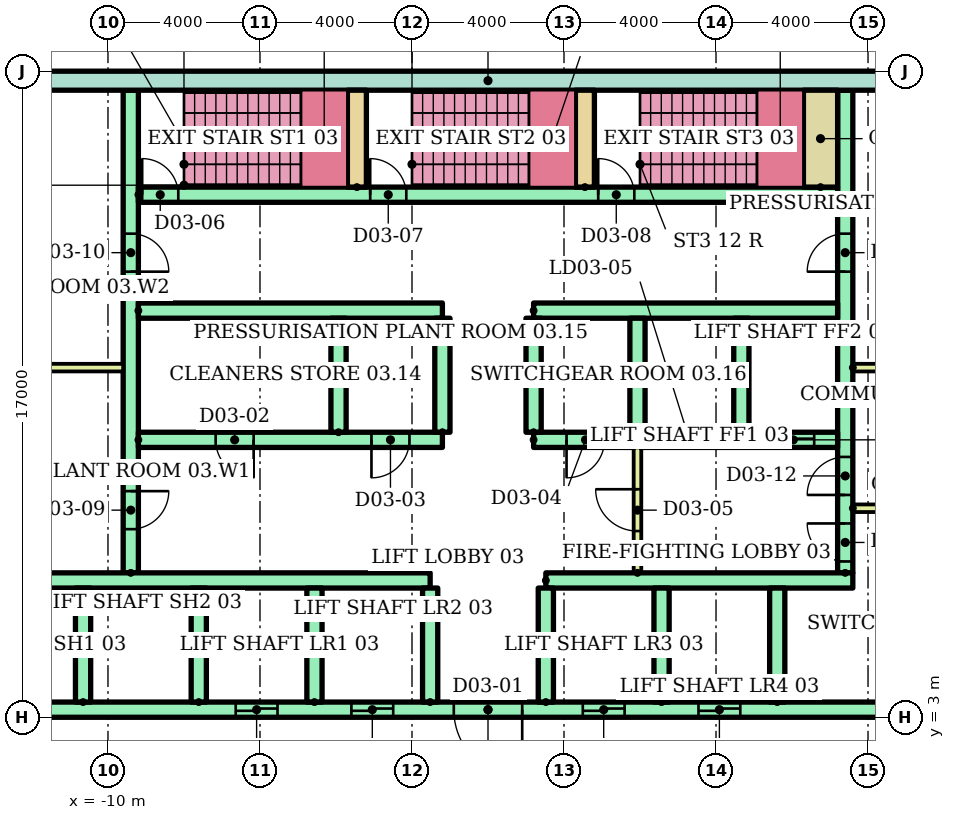
"""IFC4 building model, lengths in metres.
Left out: names, types, materials, properties, quantities, classifications, styles, units other than length and angle.
Written with IfcOpenShell. Run it as: python <this file> out.ifc"""

import sys

from ifc_helpers import new_model, si_unit, direction, frame, frame_2d, origin, place, context, subcontext, project, spatial, rectangle, extrude, element, fill, save


model = new_model("IFC4")
c1 = context("Model", 3, precision=1e-05, world=origin(), true_north=direction((0.0, 1.0)))
c2 = subcontext(c1, "Body", "Model", "MODEL_VIEW")
j1 = project(units=[si_unit("LENGTHUNIT", "METRE"), si_unit("PLANEANGLEUNIT", "RADIAN")], contexts=[c1])
p1 = place(None, origin())
s1 = spatial("IfcSite", under=j1, at=p1, CompositionType="ELEMENT")
p2 = place(p1, origin())
s2 = spatial("IfcBuilding", under=s1, at=p2, CompositionType="ELEMENT")
p3 = place(p2, frame((0.0, 0.0, 14.0)))
s3 = spatial("IfcBuildingStorey", under=s2, at=p3, CompositionType="ELEMENT", Elevation=14.0)
p4 = place(p3, frame((-13.5, 19.75, 0.0)))
e1 = element("IfcWall", 1, at=p4, inside=s3, PredefinedType="SHEAR", context=c2, shape_type="SweptSolid", body=[
    extrude(rectangle(XDim=27.0, YDim=0.5, at=frame_2d((13.5, 0.0))), origin(), (0.0, 0.0, 1.0), 3.7),
])
p5 = place(p3, frame((-9.4, 6.8, 0.0), z_axis=(0.0, 0.0, 1.0), x_axis=(0.0, 1.0, 0.0)))
e2 = element("IfcWall", 2, at=p5, inside=s3, PredefinedType="SHEAR", context=c2, shape_type="SweptSolid", body=[
    extrude(rectangle(XDim=12.7, YDim=0.4, at=frame_2d((6.35, 0.0))), origin(), (0.0, 0.0, 1.0), 3.7),
])
p6 = place(p5, frame((1.15, 0.0, 0.0)))
e3 = element("IfcOpeningElement", 3, at=p6, cuts=e2, PredefinedType="OPENING", context=c2, shape_type="SweptSolid", body=[
    extrude(rectangle(XDim=1.0, YDim=2.1, at=frame_2d((0.5, 1.05))), frame((0.0, 0.21, 0.0), z_axis=(0.0, -1.0, 0.0), x_axis=(1.0, 0.0, 0.0)), (0.0, 0.0, 1.0), 0.42),
])
p7 = place(p5, frame((7.925, 0.0, 0.0)))
e4 = element("IfcOpeningElement", 4, at=p7, cuts=e2, PredefinedType="OPENING", context=c2, shape_type="SweptSolid", body=[
    extrude(rectangle(XDim=1.0, YDim=2.1, at=frame_2d((0.5, 1.05))), frame((0.0, 0.21, 0.0), z_axis=(0.0, -1.0, 0.0), x_axis=(1.0, 0.0, 0.0)), (0.0, 0.0, 1.0), 0.42),
])
p8 = place(p3, frame((9.4, 6.8, 0.0), z_axis=(0.0, 0.0, 1.0), x_axis=(0.0, 1.0, 0.0)))
e5 = element("IfcWall", 5, at=p8, inside=s3, PredefinedType="SHEAR", context=c2, shape_type="SweptSolid", body=[
    extrude(rectangle(XDim=12.7, YDim=0.4, at=frame_2d((6.35, 0.0))), origin(), (0.0, 0.0, 1.0), 3.7),
])
p9 = place(p8, frame((0.3, 0.0, 0.0)))
e6 = element("IfcOpeningElement", 6, at=p9, cuts=e5, PredefinedType="OPENING", context=c2, shape_type="SweptSolid", body=[
    extrude(rectangle(XDim=1.0, YDim=2.1, at=frame_2d((0.5, 1.05))), frame((0.0, 0.21, 0.0), z_axis=(0.0, -1.0, 0.0), x_axis=(1.0, 0.0, 0.0)), (0.0, 0.0, 1.0), 0.42),
])
p10 = place(p8, frame((2.05, 0.0, 0.0)))
e7 = element("IfcOpeningElement", 7, at=p10, cuts=e5, PredefinedType="OPENING", context=c2, shape_type="SweptSolid", body=[
    extrude(rectangle(XDim=1.0, YDim=2.1, at=frame_2d((0.5, 1.05))), frame((0.0, 0.21, 0.0), z_axis=(0.0, -1.0, 0.0), x_axis=(1.0, 0.0, 0.0)), (0.0, 0.0, 1.0), 0.42),
])
p11 = place(p8, frame((7.925, 0.0, 0.0)))
e8 = element("IfcOpeningElement", 8, at=p11, cuts=e5, PredefinedType="OPENING", context=c2, shape_type="SweptSolid", body=[
    extrude(rectangle(XDim=1.0, YDim=2.1, at=frame_2d((0.5, 1.05))), frame((0.0, 0.21, 0.0), z_axis=(0.0, -1.0, 0.0), x_axis=(1.0, 0.0, 0.0)), (0.0, 0.0, 1.0), 0.42),
])
p12 = place(p3, frame((-13.5, 3.2, 0.0)))
e9 = element("IfcWall", 9, at=p12, inside=s3, PredefinedType="SHEAR", context=c2, shape_type="SweptSolid", body=[
    extrude(rectangle(XDim=27.0, YDim=0.4, at=frame_2d((13.5, 0.0))), origin(), (0.0, 0.0, 1.0), 3.7),
])
p13 = place(p12, frame((6.861, 0.0, 0.0)))
e10 = element("IfcOpeningElement", 10, at=p13, cuts=e9, PredefinedType="OPENING", context=c2, shape_type="SweptSolid", body=[
    extrude(rectangle(XDim=1.1, YDim=2.1, at=frame_2d((0.55, 1.05))), frame((0.0, 0.21, 0.0), z_axis=(0.0, -1.0, 0.0), x_axis=(1.0, 0.0, 0.0)), (0.0, 0.0, 1.0), 0.42),
])
p14 = place(p12, frame((9.906, 0.0, 0.0)))
e11 = element("IfcOpeningElement", 11, at=p14, cuts=e9, PredefinedType="OPENING", context=c2, shape_type="SweptSolid", body=[
    extrude(rectangle(XDim=1.1, YDim=2.1, at=frame_2d((0.55, 1.05))), frame((0.0, 0.21, 0.0), z_axis=(0.0, -1.0, 0.0), x_axis=(1.0, 0.0, 0.0)), (0.0, 0.0, 1.0), 0.42),
])
p15 = place(p12, frame((15.994, 0.0, 0.0)))
e12 = element("IfcOpeningElement", 12, at=p15, cuts=e9, PredefinedType="OPENING", context=c2, shape_type="SweptSolid", body=[
    extrude(rectangle(XDim=1.1, YDim=2.1, at=frame_2d((0.55, 1.05))), frame((0.0, 0.21, 0.0), z_axis=(0.0, -1.0, 0.0), x_axis=(1.0, 0.0, 0.0)), (0.0, 0.0, 1.0), 0.42),
])
p16 = place(p12, frame((19.039, 0.0, 0.0)))
e13 = element("IfcOpeningElement", 13, at=p16, cuts=e9, PredefinedType="OPENING", context=c2, shape_type="SweptSolid", body=[
    extrude(rectangle(XDim=1.1, YDim=2.1, at=frame_2d((0.55, 1.05))), frame((0.0, 0.21, 0.0), z_axis=(0.0, -1.0, 0.0), x_axis=(1.0, 0.0, 0.0)), (0.0, 0.0, 1.0), 0.42),
])
p17 = place(p12, frame((12.6, 0.0, 0.0)))
e14 = element("IfcOpeningElement", 14, at=p17, cuts=e9, PredefinedType="OPENING", context=c2, shape_type="SweptSolid", body=[
    extrude(rectangle(XDim=1.8, YDim=2.1, at=frame_2d((0.9, 1.05))), frame((0.0, 0.21, 0.0), z_axis=(0.0, -1.0, 0.0), x_axis=(1.0, 0.0, 0.0)), (0.0, 0.0, 1.0), 0.42),
])
p18 = place(p3, frame((-13.5, 6.6, 0.0)))
e15 = element("IfcWall", 15, at=p18, inside=s3, PredefinedType="SHEAR", context=c2, shape_type="SweptSolid", body=[
    extrude(rectangle(XDim=11.978, YDim=0.4, at=frame_2d((5.989, 0.0))), origin(), (0.0, 0.0, 1.0), 3.7),
])
p19 = place(p3, frame((1.522, 6.6, 0.0)))
e16 = element("IfcWall", 16, at=p19, inside=s3, PredefinedType="SHEAR", context=c2, shape_type="SweptSolid", body=[
    extrude(rectangle(XDim=8.078, YDim=0.4, at=frame_2d((4.039, 0.0))), origin(), (0.0, 0.0, 1.0), 3.7),
])
for number, where, z_axis, x_axis in (
    (17, (-10.656, 3.4, 0.0), (0.0, 0.0, 1.0), (0.0, 1.0, 0.0)),
    (18, (-7.611, 3.4, 0.0), (0.0, 0.0, 1.0), (0.0, 1.0, 0.0)),
    (19, (-4.567, 3.4, 0.0), (0.0, 0.0, 1.0), (0.0, 1.0, 0.0)),
    (20, (-1.522, 3.4, 0.0), (0.0, 0.0, 1.0), (0.0, 1.0, 0.0)),
    (21, (1.522, 3.4, 0.0), (0.0, 0.0, 1.0), (0.0, 1.0, 0.0)),
    (22, (4.567, 3.4, 0.0), (0.0, 0.0, 1.0), (0.0, 1.0, 0.0)),
    (23, (7.611, 3.4, 0.0), (0.0, 0.0, 1.0), (0.0, 1.0, 0.0)),
):
    element("IfcWall", number, at=place(p3, frame(where, z_axis=z_axis, x_axis=x_axis)), inside=s3, PredefinedType="SHEAR", context=c2, shape_type="SweptSolid", body=[
        extrude(rectangle(XDim=3.0, YDim=0.4, at=frame_2d((1.5, 0.0))), origin(), (0.0, 0.0, 1.0), 3.7),
    ])
p20 = place(p3, frame((-9.2, 10.3, 0.0)))
e24 = element("IfcWall", 24, at=p20, inside=s3, PredefinedType="SHEAR", context=c2, shape_type="SweptSolid", body=[
    extrude(rectangle(XDim=8.0, YDim=0.4, at=frame_2d((4.0, 0.0))), origin(), (0.0, 0.0, 1.0), 3.7),
])
p21 = place(p20, frame((2.033, 0.0, 0.0)))
e25 = element("IfcOpeningElement", 25, at=p21, cuts=e24, PredefinedType="OPENING", context=c2, shape_type="SweptSolid", body=[
    extrude(rectangle(XDim=1.0, YDim=2.1, at=frame_2d((0.5, 1.05))), frame((0.0, 0.21, 0.0), z_axis=(0.0, -1.0, 0.0), x_axis=(1.0, 0.0, 0.0)), (0.0, 0.0, 1.0), 0.42),
])
p22 = place(p20, frame((6.133, 0.0, 0.0)))
e26 = element("IfcOpeningElement", 26, at=p22, cuts=e24, PredefinedType="OPENING", context=c2, shape_type="SweptSolid", body=[
    extrude(rectangle(XDim=1.0, YDim=2.1, at=frame_2d((0.5, 1.05))), frame((0.0, 0.21, 0.0), z_axis=(0.0, -1.0, 0.0), x_axis=(1.0, 0.0, 0.0)), (0.0, 0.0, 1.0), 0.42),
])
p23 = place(p3, frame((-9.2, 13.7, 0.0)))
e27 = element("IfcWall", 27, at=p23, inside=s3, PredefinedType="SHEAR", context=c2, shape_type="SweptSolid", body=[
    extrude(rectangle(XDim=8.0, YDim=0.4, at=frame_2d((4.0, 0.0))), origin(), (0.0, 0.0, 1.0), 3.7),
])
p24 = place(p3, frame((1.2, 10.3, 0.0)))
e28 = element("IfcWall", 28, at=p24, inside=s3, PredefinedType="SHEAR", context=c2, shape_type="SweptSolid", body=[
    extrude(rectangle(XDim=8.0, YDim=0.4, at=frame_2d((4.0, 0.0))), origin(), (0.0, 0.0, 1.0), 3.7),
])
p25 = place(p24, frame((3.55, 0.0, 0.0)))
e29 = element("IfcOpeningElement", 29, at=p25, cuts=e28, PredefinedType="OPENING", context=c2, shape_type="SweptSolid", body=[
    extrude(rectangle(XDim=1.1, YDim=2.1, at=frame_2d((0.55, 1.05))), frame((0.0, 0.21, 0.0), z_axis=(0.0, -1.0, 0.0), x_axis=(1.0, 0.0, 0.0)), (0.0, 0.0, 1.0), 0.42),
])
p26 = place(p24, frame((6.283, 0.0, 0.0)))
e30 = element("IfcOpeningElement", 30, at=p26, cuts=e28, PredefinedType="OPENING", context=c2, shape_type="SweptSolid", body=[
    extrude(rectangle(XDim=1.1, YDim=2.1, at=frame_2d((0.55, 1.05))), frame((0.0, 0.21, 0.0), z_axis=(0.0, -1.0, 0.0), x_axis=(1.0, 0.0, 0.0)), (0.0, 0.0, 1.0), 0.42),
])
p27 = place(p24, frame((0.867, 0.0, 0.0)))
e31 = element("IfcOpeningElement", 31, at=p27, cuts=e28, PredefinedType="OPENING", context=c2, shape_type="SweptSolid", body=[
    extrude(rectangle(XDim=1.0, YDim=2.1, at=frame_2d((0.5, 1.05))), frame((0.0, 0.21, 0.0), z_axis=(0.0, -1.0, 0.0), x_axis=(1.0, 0.0, 0.0)), (0.0, 0.0, 1.0), 0.42),
])
p28 = place(p3, frame((1.2, 13.7, 0.0)))
e32 = element("IfcWall", 32, at=p28, inside=s3, PredefinedType="SHEAR", context=c2, shape_type="SweptSolid", body=[
    extrude(rectangle(XDim=8.0, YDim=0.4, at=frame_2d((4.0, 0.0))), origin(), (0.0, 0.0, 1.0), 3.7),
])
for number, where, z_axis, x_axis in (
    (33, (-3.933, 10.5, 0.0), (0.0, 0.0, 1.0), (0.0, 1.0, 0.0)),
    (34, (-1.2, 10.5, 0.0), (0.0, 0.0, 1.0), (0.0, 1.0, 0.0)),
    (35, (1.2, 10.5, 0.0), (0.0, 0.0, 1.0), (0.0, 1.0, 0.0)),
    (36, (3.933, 10.5, 0.0), (0.0, 0.0, 1.0), (0.0, 1.0, 0.0)),
    (37, (6.667, 10.5, 0.0), (0.0, 0.0, 1.0), (0.0, 1.0, 0.0)),
):
    element("IfcWall", number, at=place(p3, frame(where, z_axis=z_axis, x_axis=x_axis)), inside=s3, PredefinedType="SHEAR", context=c2, shape_type="SweptSolid", body=[
        extrude(rectangle(XDim=3.0, YDim=0.4, at=frame_2d((1.5, 0.0))), origin(), (0.0, 0.0, 1.0), 3.7),
    ])
p29 = place(p3, frame((3.933, 6.8, 0.0), z_axis=(0.0, 0.0, 1.0), x_axis=(0.0, 1.0, 0.0)))
e38 = element("IfcWall", 38, at=p29, inside=s3, PredefinedType="PARTITIONING", context=c2, shape_type="SweptSolid", body=[
    extrude(rectangle(XDim=3.3, YDim=0.2, at=frame_2d((1.65, 0.0))), origin(), (0.0, 0.0, 1.0), 3.7),
])
p30 = place(p29, frame((1.1, 0.0, 0.0)))
e39 = element("IfcOpeningElement", 39, at=p30, cuts=e38, PredefinedType="OPENING", context=c2, shape_type="SweptSolid", body=[
    extrude(rectangle(XDim=1.1, YDim=2.1, at=frame_2d((0.55, 1.05))), frame((0.0, 0.11, 0.0), z_axis=(0.0, -1.0, 0.0), x_axis=(1.0, 0.0, 0.0)), (0.0, 0.0, 1.0), 0.22),
])
p31 = place(p3, frame((-9.2, 16.75, 0.0)))
e40 = element("IfcWall", 40, at=p31, inside=s3, PredefinedType="SHEAR", context=c2, shape_type="SweptSolid", body=[
    extrude(rectangle(XDim=18.4, YDim=0.4, at=frame_2d((9.2, 0.0))), origin(), (0.0, 0.0, 1.0), 3.7),
])
p32 = place(p31, frame((0.1, 0.0, 0.0)))
e41 = element("IfcOpeningElement", 41, at=p32, cuts=e40, PredefinedType="OPENING", context=c2, shape_type="SweptSolid", body=[
    extrude(rectangle(XDim=0.95, YDim=2.1, at=frame_2d((0.475, 1.05))), frame((0.0, 0.21, 0.0), z_axis=(0.0, -1.0, 0.0), x_axis=(1.0, 0.0, 0.0)), (0.0, 0.0, 1.0), 0.42),
])
p33 = place(p31, frame((6.1, 0.0, 0.0)))
e42 = element("IfcOpeningElement", 42, at=p33, cuts=e40, PredefinedType="OPENING", context=c2, shape_type="SweptSolid", body=[
    extrude(rectangle(XDim=0.95, YDim=2.1, at=frame_2d((0.475, 1.05))), frame((0.0, 0.21, 0.0), z_axis=(0.0, -1.0, 0.0), x_axis=(1.0, 0.0, 0.0)), (0.0, 0.0, 1.0), 0.42),
])
p34 = place(p31, frame((12.1, 0.0, 0.0)))
e43 = element("IfcOpeningElement", 43, at=p34, cuts=e40, PredefinedType="OPENING", context=c2, shape_type="SweptSolid", body=[
    extrude(rectangle(XDim=0.95, YDim=2.1, at=frame_2d((0.475, 1.05))), frame((0.0, 0.21, 0.0), z_axis=(0.0, -1.0, 0.0), x_axis=(1.0, 0.0, 0.0)), (0.0, 0.0, 1.0), 0.42),
])
for number, where, z_axis, x_axis in (
    (44, (-3.45, 16.95, 0.0), (0.0, 0.0, 1.0), (0.0, 1.0, 0.0)),
    (45, (2.55, 16.95, 0.0), (0.0, 0.0, 1.0), (0.0, 1.0, 0.0)),
):
    element("IfcWall", number, at=place(p3, frame(where, z_axis=z_axis, x_axis=x_axis)), inside=s3, PredefinedType="SHEAR", context=c2, shape_type="SweptSolid", body=[
        extrude(rectangle(XDim=2.55, YDim=0.5, at=frame_2d((1.275, 0.0))), origin(), (0.0, 0.0, 1.0), 3.7),
    ])
p35 = place(p3, frame((8.75, 16.95, 0.0), z_axis=(0.0, 0.0, 1.0), x_axis=(0.0, 1.0, 0.0)))
e46 = element("IfcWall", 46, at=p35, inside=s3, PredefinedType="SHEAR", context=c2, shape_type="SweptSolid", body=[
    extrude(rectangle(XDim=2.55, YDim=0.9, at=frame_2d((1.275, 0.0))), origin(), (0.0, 0.0, 1.0), 3.7),
])
for number, where in (
    (47, (-13.5, 12.2, 0.0)),
    (48, (9.6, 8.5, 0.0)),
    (49, (9.6, 12.2, 0.0)),
):
    element("IfcWall", number, at=place(p3, frame(where)), inside=s3, PredefinedType="PARTITIONING", context=c2, shape_type="SweptSolid", body=[
        extrude(rectangle(XDim=3.9, YDim=0.2, at=frame_2d((1.95, 0.0))), origin(), (0.0, 0.0, 1.0), 3.7),
    ])
p36 = place(p13, origin())
e50 = element("IfcDoor", 50, at=p36, inside=s3, OperationType="SLIDING_TO_LEFT", PredefinedType="DOOR", context=c2, shape_type="SweptSolid", body=[
    extrude(rectangle(XDim=1.1, YDim=2.1, at=frame_2d((0.55, 1.05))), frame((0.0, 0.025, 0.0), z_axis=(0.0, -1.0, 0.0), x_axis=(1.0, 0.0, 0.0)), (0.0, 0.0, 1.0), 0.05),
])
fill(e10, e50)
p37 = place(p14, origin())
e51 = element("IfcDoor", 51, at=p37, inside=s3, OperationType="SLIDING_TO_LEFT", PredefinedType="DOOR", context=c2, shape_type="SweptSolid", body=[
    extrude(rectangle(XDim=1.1, YDim=2.1, at=frame_2d((0.55, 1.05))), frame((0.0, 0.025, 0.0), z_axis=(0.0, -1.0, 0.0), x_axis=(1.0, 0.0, 0.0)), (0.0, 0.0, 1.0), 0.05),
])
fill(e11, e51)
p38 = place(p15, origin())
e52 = element("IfcDoor", 52, at=p38, inside=s3, OperationType="SLIDING_TO_LEFT", PredefinedType="DOOR", context=c2, shape_type="SweptSolid", body=[
    extrude(rectangle(XDim=1.1, YDim=2.1, at=frame_2d((0.55, 1.05))), frame((0.0, 0.025, 0.0), z_axis=(0.0, -1.0, 0.0), x_axis=(1.0, 0.0, 0.0)), (0.0, 0.0, 1.0), 0.05),
])
fill(e12, e52)
p39 = place(p16, origin())
e53 = element("IfcDoor", 53, at=p39, inside=s3, OperationType="SLIDING_TO_LEFT", PredefinedType="DOOR", context=c2, shape_type="SweptSolid", body=[
    extrude(rectangle(XDim=1.1, YDim=2.1, at=frame_2d((0.55, 1.05))), frame((0.0, 0.025, 0.0), z_axis=(0.0, -1.0, 0.0), x_axis=(1.0, 0.0, 0.0)), (0.0, 0.0, 1.0), 0.05),
])
fill(e13, e53)
p40 = place(p17, frame((1.8, 0.0, 0.0), z_axis=(0.0, 0.0, 1.0), x_axis=(-1.0, 0.0, 0.0)))
e54 = element("IfcDoor", 54, at=p40, inside=s3, OperationType="DOUBLE_DOOR_SINGLE_SWING", PredefinedType="DOOR", context=c2, shape_type="SweptSolid", body=[
    extrude(rectangle(XDim=1.8, YDim=2.1, at=frame_2d((0.9, 1.05))), frame((0.0, 0.025, 0.0), z_axis=(0.0, -1.0, 0.0), x_axis=(1.0, 0.0, 0.0)), (0.0, 0.0, 1.0), 0.05),
])
fill(e14, e54)
p41 = place(p25, origin())
e55 = element("IfcDoor", 55, at=p41, inside=s3, OperationType="SLIDING_TO_LEFT", PredefinedType="DOOR", context=c2, shape_type="SweptSolid", body=[
    extrude(rectangle(XDim=1.1, YDim=2.1, at=frame_2d((0.55, 1.05))), frame((0.0, 0.025, 0.0), z_axis=(0.0, -1.0, 0.0), x_axis=(1.0, 0.0, 0.0)), (0.0, 0.0, 1.0), 0.05),
])
fill(e29, e55)
p42 = place(p26, origin())
e56 = element("IfcDoor", 56, at=p42, inside=s3, OperationType="SLIDING_TO_LEFT", PredefinedType="DOOR", context=c2, shape_type="SweptSolid", body=[
    extrude(rectangle(XDim=1.1, YDim=2.1, at=frame_2d((0.55, 1.05))), frame((0.0, 0.025, 0.0), z_axis=(0.0, -1.0, 0.0), x_axis=(1.0, 0.0, 0.0)), (0.0, 0.0, 1.0), 0.05),
])
fill(e30, e56)
p43 = place(p21, frame((1.0, 0.0, 0.0), z_axis=(0.0, 0.0, 1.0), x_axis=(-1.0, 0.0, 0.0)))
e57 = element("IfcDoor", 57, at=p43, inside=s3, OperationType="SINGLE_SWING_RIGHT", PredefinedType="DOOR", context=c2, shape_type="SweptSolid", body=[
    extrude(rectangle(XDim=1.0, YDim=2.1, at=frame_2d((0.5, 1.05))), frame((0.0, 0.025, 0.0), z_axis=(0.0, -1.0, 0.0), x_axis=(1.0, 0.0, 0.0)), (0.0, 0.0, 1.0), 0.05),
])
fill(e25, e57)
p44 = place(p22, frame((1.0, 0.0, 0.0), z_axis=(0.0, 0.0, 1.0), x_axis=(-1.0, 0.0, 0.0)))
e58 = element("IfcDoor", 58, at=p44, inside=s3, OperationType="SINGLE_SWING_LEFT", PredefinedType="DOOR", context=c2, shape_type="SweptSolid", body=[
    extrude(rectangle(XDim=1.0, YDim=2.1, at=frame_2d((0.5, 1.05))), frame((0.0, 0.025, 0.0), z_axis=(0.0, -1.0, 0.0), x_axis=(1.0, 0.0, 0.0)), (0.0, 0.0, 1.0), 0.05),
])
fill(e26, e58)
p45 = place(p27, frame((1.0, 0.0, 0.0), z_axis=(0.0, 0.0, 1.0), x_axis=(-1.0, 0.0, 0.0)))
e59 = element("IfcDoor", 59, at=p45, inside=s3, OperationType="SINGLE_SWING_LEFT", PredefinedType="DOOR", context=c2, shape_type="SweptSolid", body=[
    extrude(rectangle(XDim=1.0, YDim=2.1, at=frame_2d((0.5, 1.05))), frame((0.0, 0.025, 0.0), z_axis=(0.0, -1.0, 0.0), x_axis=(1.0, 0.0, 0.0)), (0.0, 0.0, 1.0), 0.05),
])
fill(e31, e59)
p46 = place(p30, origin())
e60 = element("IfcDoor", 60, at=p46, inside=s3, OperationType="SINGLE_SWING_RIGHT", PredefinedType="DOOR", context=c2, shape_type="SweptSolid", body=[
    extrude(rectangle(XDim=1.1, YDim=2.1, at=frame_2d((0.55, 1.05))), frame((0.0, 0.025, 0.0), z_axis=(0.0, -1.0, 0.0), x_axis=(1.0, 0.0, 0.0)), (0.0, 0.0, 1.0), 0.05),
])
fill(e39, e60)
p47 = place(p32, origin())
e61 = element("IfcDoor", 61, at=p47, inside=s3, OperationType="SINGLE_SWING_LEFT", PredefinedType="DOOR", context=c2, shape_type="SweptSolid", body=[
    extrude(rectangle(XDim=0.95, YDim=2.1, at=frame_2d((0.475, 1.05))), frame((0.0, 0.025, 0.0), z_axis=(0.0, -1.0, 0.0), x_axis=(1.0, 0.0, 0.0)), (0.0, 0.0, 1.0), 0.05),
])
fill(e41, e61)
p48 = place(p33, origin())
e62 = element("IfcDoor", 62, at=p48, inside=s3, OperationType="SINGLE_SWING_LEFT", PredefinedType="DOOR", context=c2, shape_type="SweptSolid", body=[
    extrude(rectangle(XDim=0.95, YDim=2.1, at=frame_2d((0.475, 1.05))), frame((0.0, 0.025, 0.0), z_axis=(0.0, -1.0, 0.0), x_axis=(1.0, 0.0, 0.0)), (0.0, 0.0, 1.0), 0.05),
])
fill(e42, e62)
p49 = place(p34, origin())
e63 = element("IfcDoor", 63, at=p49, inside=s3, OperationType="SINGLE_SWING_LEFT", PredefinedType="DOOR", context=c2, shape_type="SweptSolid", body=[
    extrude(rectangle(XDim=0.95, YDim=2.1, at=frame_2d((0.475, 1.05))), frame((0.0, 0.025, 0.0), z_axis=(0.0, -1.0, 0.0), x_axis=(1.0, 0.0, 0.0)), (0.0, 0.0, 1.0), 0.05),
])
fill(e43, e63)
p50 = place(p6, frame((1.0, 0.0, 0.0), z_axis=(0.0, 0.0, 1.0), x_axis=(-1.0, 0.0, 0.0)))
e64 = element("IfcDoor", 64, at=p50, inside=s3, OperationType="SINGLE_SWING_RIGHT", PredefinedType="DOOR", context=c2, shape_type="SweptSolid", body=[
    extrude(rectangle(XDim=1.0, YDim=2.1, at=frame_2d((0.5, 1.05))), frame((0.0, 0.025, 0.0), z_axis=(0.0, -1.0, 0.0), x_axis=(1.0, 0.0, 0.0)), (0.0, 0.0, 1.0), 0.05),
])
fill(e3, e64)
p51 = place(p7, frame((1.0, 0.0, 0.0), z_axis=(0.0, 0.0, 1.0), x_axis=(-1.0, 0.0, 0.0)))
e65 = element("IfcDoor", 65, at=p51, inside=s3, OperationType="SINGLE_SWING_LEFT", PredefinedType="DOOR", context=c2, shape_type="SweptSolid", body=[
    extrude(rectangle(XDim=1.0, YDim=2.1, at=frame_2d((0.5, 1.05))), frame((0.0, 0.025, 0.0), z_axis=(0.0, -1.0, 0.0), x_axis=(1.0, 0.0, 0.0)), (0.0, 0.0, 1.0), 0.05),
])
fill(e4, e65)
p52 = place(p9, origin())
e66 = element("IfcDoor", 66, at=p52, inside=s3, OperationType="SINGLE_SWING_RIGHT", PredefinedType="DOOR", context=c2, shape_type="SweptSolid", body=[
    extrude(rectangle(XDim=1.0, YDim=2.1, at=frame_2d((0.5, 1.05))), frame((0.0, 0.025, 0.0), z_axis=(0.0, -1.0, 0.0), x_axis=(1.0, 0.0, 0.0)), (0.0, 0.0, 1.0), 0.05),
])
fill(e6, e66)
p53 = place(p10, origin())
e67 = element("IfcDoor", 67, at=p53, inside=s3, OperationType="SINGLE_SWING_LEFT", PredefinedType="DOOR", context=c2, shape_type="SweptSolid", body=[
    extrude(rectangle(XDim=1.0, YDim=2.1, at=frame_2d((0.5, 1.05))), frame((0.0, 0.025, 0.0), z_axis=(0.0, -1.0, 0.0), x_axis=(1.0, 0.0, 0.0)), (0.0, 0.0, 1.0), 0.05),
])
fill(e7, e67)
p54 = place(p11, origin())
e68 = element("IfcDoor", 68, at=p54, inside=s3, OperationType="SINGLE_SWING_LEFT", PredefinedType="DOOR", context=c2, shape_type="SweptSolid", body=[
    extrude(rectangle(XDim=1.0, YDim=2.1, at=frame_2d((0.5, 1.05))), frame((0.0, 0.025, 0.0), z_axis=(0.0, -1.0, 0.0), x_axis=(1.0, 0.0, 0.0)), (0.0, 0.0, 1.0), 0.05),
])
fill(e8, e68)
save(model, sys.argv[1])
